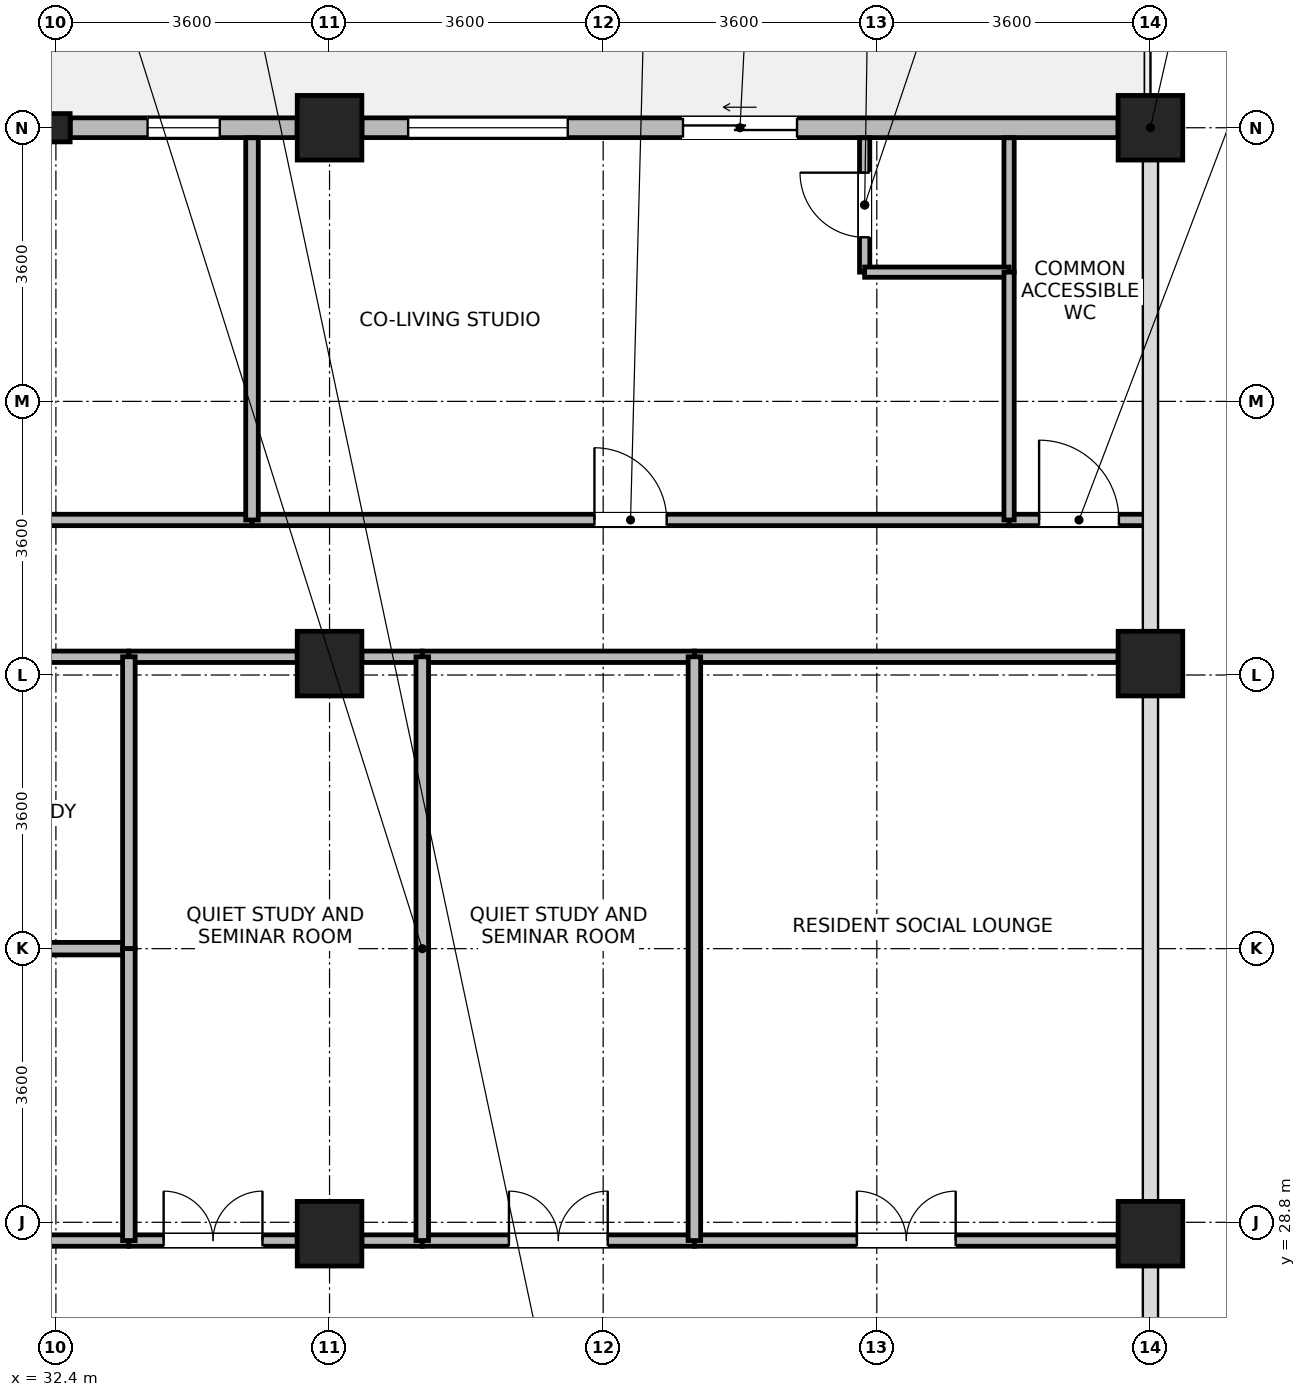
"""IFC4 building model, lengths in metres.
Left out: names, types, materials, properties, quantities, classifications, styles, units other than length and angle.
Written with IfcOpenShell. Run it as: python <this file> out.ifc"""

import sys

from ifc_helpers import new_model, si_unit, direction, frame, frame_2d, origin, origin_2d, place, context, subcontext, project, spatial, rectangle, i_section, extrude, source, transform, mapped, element, fill, save


model = new_model("IFC4")
c1 = context("Model", 3, precision=1e-05, world=origin(), true_north=direction((0.0, 1.0)))
c2 = subcontext(c1, "Body", "Model", "MODEL_VIEW")
j1 = project(units=[si_unit("LENGTHUNIT", "METRE"), si_unit("PLANEANGLEUNIT", "RADIAN")], contexts=[c1])
p1 = place(None, origin())
s1 = spatial("IfcSite", under=j1, at=p1, CompositionType="ELEMENT")
p2 = place(p1, origin())
s2 = spatial("IfcBuilding", under=s1, at=p2, CompositionType="ELEMENT")
p3 = place(p2, frame((0.0, 0.0, 253.6)))
s3 = spatial("IfcBuildingStorey", under=s2, at=p3, CompositionType="ELEMENT", Elevation=253.6)
m1 = source(origin(), c2, "Body", "SweptSolid", [
    extrude(rectangle(XDim=0.85, YDim=0.85, at=origin_2d()), origin(), (0.0, 0.0, 1.0), 3.7),
])
for number, where, z_axis, x_axis in (
    (1, (36.0, 43.2, 0.0), (0.0, 0.0, 1.0), (1.0, 0.0, 0.0)),
    (2, (36.0, 28.65, 0.0), (0.0, 0.0, 1.0), (1.0, 0.0, 0.0)),
    (3, (36.0, 36.15, 0.0), (0.0, 0.0, 1.0), (1.0, 0.0, 0.0)),
    (4, (46.8, 28.65, 0.0), (0.0, 0.0, 1.0), (1.0, 0.0, 0.0)),
    (5, (46.8, 36.15, 0.0), (0.0, 0.0, 1.0), (1.0, 0.0, 0.0)),
    (6, (46.8, 43.2, 0.0), (0.0, 0.0, 1.0), (1.0, 0.0, 0.0)),
):
    element("IfcColumn", number, at=place(p3, frame(where, z_axis=z_axis, x_axis=x_axis)), inside=s3, PredefinedType="COLUMN", context=c2, shape_type="MappedRepresentation", body=[
        mapped(m1, transform((0.0, 0.0, 0.0), x_axis=(1.0, 0.0, 0.0), y_axis=(0.0, 1.0, 0.0), z_axis=(0.0, 0.0, 1.0), scale=1.0)),
    ])
m2 = source(origin(), c2, "Body", "SweptSolid", [
    extrude(i_section(OverallWidth=0.374, OverallDepth=0.372, WebThickness=0.015, FlangeThickness=0.026, FilletRadius=0.015, at=origin_2d()), origin(), (0.0, 0.0, 1.0), 3.7),
])
p4 = place(p3, frame((32.4, 43.2, 0.0), z_axis=(0.0, 0.0, 1.0), x_axis=(1.0, 0.0, 0.0)))
e7 = element("IfcColumn", 7, at=p4, inside=s3, PredefinedType="COLUMN", context=c2, shape_type="MappedRepresentation", body=[
    mapped(m2, transform((0.0, 0.0, 0.0), x_axis=(1.0, 0.0, 0.0), y_axis=(0.0, 1.0, 0.0), z_axis=(0.0, 0.0, 1.0), scale=1.0)),
])
p5 = place(p3, frame((36.426, 43.2, 0.0), z_axis=(0.0, 0.0, 1.0), x_axis=(1.0, 0.0, 0.0)))
e8 = element("IfcWall", 8, at=p5, inside=s3, PredefinedType="STANDARD", context=c2, shape_type="SweptSolid", body=[
    extrude(rectangle(XDim=9.948, YDim=0.26, at=frame_2d((4.974, 0.0))), origin(), (0.0, 0.0, 1.0), 3.055),
])
p6 = place(p5, frame((4.224, 0.0, 0.0)))
e9 = element("IfcOpeningElement", 9, at=p6, cuts=e8, PredefinedType="OPENING", context=c2, shape_type="SweptSolid", body=[
    extrude(rectangle(XDim=1.5, YDim=2.15, at=frame_2d((0.75, 1.075))), frame((0.0, 0.14, 0.0), z_axis=(0.0, -1.0, 0.0), x_axis=(1.0, 0.0, 0.0)), (0.0, 0.0, 1.0), 0.28),
])
p7 = place(p5, frame((0.608, 0.0, 0.85)))
e10 = element("IfcOpeningElement", 10, at=p7, cuts=e8, PredefinedType="OPENING", context=c2, shape_type="SweptSolid", body=[
    extrude(rectangle(XDim=2.1, YDim=1.95, at=frame_2d((1.05, 0.975))), frame((0.0, 0.14, 0.0), z_axis=(0.0, -1.0, 0.0), x_axis=(1.0, 0.0, 0.0)), (0.0, 0.0, 1.0), 0.28),
])
p8 = place(p3, frame((32.588, 43.2, 0.0), z_axis=(0.0, 0.0, 1.0), x_axis=(1.0, 0.0, 0.0)))
e11 = element("IfcWall", 11, at=p8, inside=s3, PredefinedType="STANDARD", context=c2, shape_type="SweptSolid", body=[
    extrude(rectangle(XDim=2.986, YDim=0.26, at=frame_2d((1.493, 0.0))), origin(), (0.0, 0.0, 1.0), 3.055),
])
p9 = place(p8, frame((1.018, 0.0, 0.85)))
e12 = element("IfcOpeningElement", 12, at=p9, cuts=e11, PredefinedType="OPENING", context=c2, shape_type="SweptSolid", body=[
    extrude(rectangle(XDim=0.95, YDim=1.75, at=frame_2d((0.475, 0.875))), frame((0.0, 0.14, 0.0), z_axis=(0.0, -1.0, 0.0), x_axis=(1.0, 0.0, 0.0)), (0.0, 0.0, 1.0), 0.28),
])
p10 = place(p3, frame((43.04, 41.3, 0.0), z_axis=(0.0, 0.0, 1.0), x_axis=(0.0, 1.0, 0.0)))
e13 = element("IfcWall", 13, at=p10, inside=s3, PredefinedType="PARTITIONING", context=c2, shape_type="SweptSolid", body=[
    extrude(rectangle(XDim=1.768, YDim=0.135, at=frame_2d((0.884, 0.0))), origin(), (0.0, 0.0, 1.0), 3.455),
])
p11 = place(p10, frame((0.459, 0.0, 0.0)))
e14 = element("IfcOpeningElement", 14, at=p11, cuts=e13, PredefinedType="OPENING", context=c2, shape_type="SweptSolid", body=[
    extrude(rectangle(XDim=0.85, YDim=2.04, at=frame_2d((0.425, 1.02))), frame((0.0, 0.078, 0.0), z_axis=(0.0, -1.0, 0.0), x_axis=(1.0, 0.0, 0.0)), (0.0, 0.0, 1.0), 0.155),
])
p12 = place(p3, frame((44.94, 41.3, 0.0), z_axis=(0.0, 0.0, 1.0), x_axis=(0.0, 1.0, 0.0)))
e15 = element("IfcWall", 15, at=p12, inside=s3, PredefinedType="PARTITIONING", context=c2, shape_type="SweptSolid", body=[
    extrude(rectangle(XDim=1.768, YDim=0.135, at=frame_2d((0.884, 0.0))), origin(), (0.0, 0.0, 1.0), 3.455),
])
p13 = place(p3, frame((43.04, 41.3, 0.0), z_axis=(0.0, 0.0, 1.0), x_axis=(1.0, 0.0, 0.0)))
e16 = element("IfcWall", 16, at=p13, inside=s3, PredefinedType="PARTITIONING", context=c2, shape_type="SweptSolid", body=[
    extrude(rectangle(XDim=1.9, YDim=0.135, at=frame_2d((0.95, 0.0))), origin(), (0.0, 0.0, 1.0), 3.455),
])
p14 = place(p3, frame((23.12, 38.04, 0.0), z_axis=(0.0, 0.0, 1.0), x_axis=(1.0, 0.0, 0.0)))
e17 = element("IfcWall", 17, at=p14, inside=s3, PredefinedType="PARTITIONING", context=c2, shape_type="SweptSolid", body=[
    extrude(rectangle(XDim=11.86, YDim=0.15, at=frame_2d((5.93, 0.0))), origin(), (0.0, 0.0, 1.0), 3.455),
])
p15 = place(p14, frame((5.48, 0.0, 0.0)))
e18 = element("IfcOpeningElement", 18, at=p15, cuts=e17, PredefinedType="OPENING", context=c2, shape_type="SweptSolid", body=[
    extrude(rectangle(XDim=0.9, YDim=2.08, at=frame_2d((0.45, 1.04))), frame((0.0, 0.085, 0.0), z_axis=(0.0, -1.0, 0.0), x_axis=(1.0, 0.0, 0.0)), (0.0, 0.0, 1.0), 0.17),
])
p16 = place(p3, frame((34.98, 38.04, 0.0), z_axis=(0.0, 0.0, 1.0), x_axis=(1.0, 0.0, 0.0)))
e19 = element("IfcWall", 19, at=p16, inside=s3, PredefinedType="PARTITIONING", context=c2, shape_type="SweptSolid", body=[
    extrude(rectangle(XDim=9.96, YDim=0.15, at=frame_2d((4.98, 0.0))), origin(), (0.0, 0.0, 1.0), 3.455),
])
p17 = place(p16, frame((4.505, 0.0, 0.0)))
e20 = element("IfcOpeningElement", 20, at=p17, cuts=e19, PredefinedType="OPENING", context=c2, shape_type="SweptSolid", body=[
    extrude(rectangle(XDim=0.95, YDim=2.1, at=frame_2d((0.475, 1.05))), frame((0.0, 0.085, 0.0), z_axis=(0.0, -1.0, 0.0), x_axis=(1.0, 0.0, 0.0)), (0.0, 0.0, 1.0), 0.17),
])
p18 = place(p3, frame((40.8, 28.56, 0.0), z_axis=(0.0, 0.0, 1.0), x_axis=(1.0, 0.0, 0.0)))
e21 = element("IfcWall", 21, at=p18, inside=s3, PredefinedType="PARTITIONING", context=c2, shape_type="SweptSolid", body=[
    extrude(rectangle(XDim=5.575, YDim=0.15, at=frame_2d((2.788, 0.0))), origin(), (0.0, 0.0, 1.0), 2.905),
])
p19 = place(p18, frame((2.137, 0.0, 0.0)))
e22 = element("IfcOpeningElement", 22, at=p19, cuts=e21, PredefinedType="OPENING", context=c2, shape_type="SweptSolid", body=[
    extrude(rectangle(XDim=1.3, YDim=2.12, at=frame_2d((0.65, 1.06))), frame((0.0, 0.085, 0.0), z_axis=(0.0, -1.0, 0.0), x_axis=(1.0, 0.0, 0.0)), (0.0, 0.0, 1.0), 0.17),
])
p20 = place(p3, frame((40.8, 36.24, 0.0), z_axis=(0.0, 0.0, 1.0), x_axis=(1.0, 0.0, 0.0)))
e23 = element("IfcWall", 23, at=p20, inside=s3, PredefinedType="PARTITIONING", context=c2, shape_type="SweptSolid", body=[
    extrude(rectangle(XDim=5.575, YDim=0.15, at=frame_2d((2.788, 0.0))), origin(), (0.0, 0.0, 1.0), 2.905),
])
p21 = place(p3, frame((29.225, 28.56, 0.0), z_axis=(0.0, 0.0, 1.0), x_axis=(1.0, 0.0, 0.0)))
e24 = element("IfcWall", 24, at=p21, inside=s3, PredefinedType="PARTITIONING", context=c2, shape_type="SweptSolid", body=[
    extrude(rectangle(XDim=4.135, YDim=0.15, at=frame_2d((2.067, 0.0))), origin(), (0.0, 0.0, 1.0), 2.905),
])
p22 = place(p21, frame((1.637, 0.0, 0.0)))
e25 = element("IfcOpeningElement", 25, at=p22, cuts=e24, PredefinedType="OPENING", context=c2, shape_type="SweptSolid", body=[
    extrude(rectangle(XDim=0.86, YDim=2.02, at=frame_2d((0.43, 1.01))), frame((0.0, 0.085, 0.0), z_axis=(0.0, -1.0, 0.0), x_axis=(1.0, 0.0, 0.0)), (0.0, 0.0, 1.0), 0.17),
])
p23 = place(p3, frame((29.225, 36.24, 0.0), z_axis=(0.0, 0.0, 1.0), x_axis=(1.0, 0.0, 0.0)))
e26 = element("IfcWall", 26, at=p23, inside=s3, PredefinedType="PARTITIONING", context=c2, shape_type="SweptSolid", body=[
    extrude(rectangle(XDim=4.135, YDim=0.15, at=frame_2d((2.067, 0.0))), origin(), (0.0, 0.0, 1.0), 2.905),
])
p24 = place(p23, frame((1.417, 0.0, 0.0)))
e27 = element("IfcOpeningElement", 27, at=p24, cuts=e26, PredefinedType="OPENING", context=c2, shape_type="SweptSolid", body=[
    extrude(rectangle(XDim=1.3, YDim=2.12, at=frame_2d((0.65, 1.06))), frame((0.0, 0.085, 0.0), z_axis=(0.0, -1.0, 0.0), x_axis=(1.0, 0.0, 0.0)), (0.0, 0.0, 1.0), 0.17),
])
p25 = place(p3, frame((33.36, 28.56, 0.0), z_axis=(0.0, 0.0, 1.0), x_axis=(1.0, 0.0, 0.0)))
e28 = element("IfcWall", 28, at=p25, inside=s3, PredefinedType="PARTITIONING", context=c2, shape_type="SweptSolid", body=[
    extrude(rectangle(XDim=2.215, YDim=0.15, at=frame_2d((1.107, 0.0))), origin(), (0.0, 0.0, 1.0), 2.905),
])
p26 = place(p25, frame((0.458, 0.0, 0.0)))
e29 = element("IfcOpeningElement", 29, at=p26, cuts=e28, PredefinedType="OPENING", context=c2, shape_type="SweptSolid", body=[
    extrude(rectangle(XDim=1.3, YDim=2.12, at=frame_2d((0.65, 1.06))), frame((0.0, 0.085, 0.0), z_axis=(0.0, -1.0, 0.0), x_axis=(1.0, 0.0, 0.0)), (0.0, 0.0, 1.0), 0.17),
])
p27 = place(p3, frame((36.425, 28.56, 0.0), z_axis=(0.0, 0.0, 1.0), x_axis=(1.0, 0.0, 0.0)))
e30 = element("IfcWall", 30, at=p27, inside=s3, PredefinedType="PARTITIONING", context=c2, shape_type="SweptSolid", body=[
    extrude(rectangle(XDim=0.795, YDim=0.15, at=frame_2d((0.397, 0.0))), origin(), (0.0, 0.0, 1.0), 2.905),
])
p28 = place(p3, frame((33.36, 36.24, 0.0), z_axis=(0.0, 0.0, 1.0), x_axis=(1.0, 0.0, 0.0)))
e31 = element("IfcWall", 31, at=p28, inside=s3, PredefinedType="PARTITIONING", context=c2, shape_type="SweptSolid", body=[
    extrude(rectangle(XDim=2.215, YDim=0.15, at=frame_2d((1.107, 0.0))), origin(), (0.0, 0.0, 1.0), 2.905),
])
p29 = place(p3, frame((36.425, 36.24, 0.0), z_axis=(0.0, 0.0, 1.0), x_axis=(1.0, 0.0, 0.0)))
e32 = element("IfcWall", 32, at=p29, inside=s3, PredefinedType="PARTITIONING", context=c2, shape_type="SweptSolid", body=[
    extrude(rectangle(XDim=0.795, YDim=0.15, at=frame_2d((0.397, 0.0))), origin(), (0.0, 0.0, 1.0), 2.905),
])
p30 = place(p3, frame((37.22, 28.56, 0.0), z_axis=(0.0, 0.0, 1.0), x_axis=(1.0, 0.0, 0.0)))
e33 = element("IfcWall", 33, at=p30, inside=s3, PredefinedType="PARTITIONING", context=c2, shape_type="SweptSolid", body=[
    extrude(rectangle(XDim=3.58, YDim=0.15, at=frame_2d((1.79, 0.0))), origin(), (0.0, 0.0, 1.0), 2.905),
])
p31 = place(p30, frame((1.14, 0.0, 0.0)))
e34 = element("IfcOpeningElement", 34, at=p31, cuts=e33, PredefinedType="OPENING", context=c2, shape_type="SweptSolid", body=[
    extrude(rectangle(XDim=1.3, YDim=2.12, at=frame_2d((0.65, 1.06))), frame((0.0, 0.085, 0.0), z_axis=(0.0, -1.0, 0.0), x_axis=(1.0, 0.0, 0.0)), (0.0, 0.0, 1.0), 0.17),
])
p32 = place(p3, frame((37.22, 36.24, 0.0), z_axis=(0.0, 0.0, 1.0), x_axis=(1.0, 0.0, 0.0)))
e35 = element("IfcWall", 35, at=p32, inside=s3, PredefinedType="PARTITIONING", context=c2, shape_type="SweptSolid", body=[
    extrude(rectangle(XDim=3.58, YDim=0.15, at=frame_2d((1.79, 0.0))), origin(), (0.0, 0.0, 1.0), 2.905),
])
p33 = place(p3, frame((44.94, 38.04, 0.0), z_axis=(0.0, 0.0, 1.0), x_axis=(1.0, 0.0, 0.0)))
e36 = element("IfcWall", 36, at=p33, inside=s3, PredefinedType="PARTITIONING", context=c2, shape_type="SweptSolid", body=[
    extrude(rectangle(XDim=1.84, YDim=0.15, at=frame_2d((0.92, 0.0))), origin(), (0.0, 0.0, 1.0), 3.455),
])
p34 = place(p33, frame((0.395, 0.0, 0.0)))
e37 = element("IfcOpeningElement", 37, at=p34, cuts=e36, PredefinedType="OPENING", context=c2, shape_type="SweptSolid", body=[
    extrude(rectangle(XDim=1.05, YDim=2.12, at=frame_2d((0.525, 1.06))), frame((0.0, 0.085, 0.0), z_axis=(0.0, -1.0, 0.0), x_axis=(1.0, 0.0, 0.0)), (0.0, 0.0, 1.0), 0.17),
])
for number, where, z_axis, x_axis in (
    (38, (37.22, 28.56, 0.0), (0.0, 0.0, 1.0), (0.0, 1.0, 0.0)),
    (39, (40.8, 28.56, 0.0), (0.0, 0.0, 1.0), (0.0, 1.0, 0.0)),
):
    element("IfcWall", number, at=place(p3, frame(where, z_axis=z_axis, x_axis=x_axis)), inside=s3, PredefinedType="PARTITIONING", context=c2, shape_type="SweptSolid", body=[
        extrude(rectangle(XDim=7.68, YDim=0.165, at=frame_2d((3.84, 0.0))), origin(), (0.0, 0.0, 1.0), 3.455),
    ])
p35 = place(p3, frame((34.98, 38.04, 0.0), z_axis=(0.0, 0.0, 1.0), x_axis=(0.0, 1.0, 0.0)))
e40 = element("IfcWall", 40, at=p35, inside=s3, PredefinedType="PARTITIONING", context=c2, shape_type="SweptSolid", body=[
    extrude(rectangle(XDim=5.028, YDim=0.165, at=frame_2d((2.514, 0.0))), origin(), (0.0, 0.0, 1.0), 3.455),
])
p36 = place(p3, frame((28.84, 32.4, 0.0), z_axis=(0.0, 0.0, 1.0), x_axis=(1.0, 0.0, 0.0)))
e41 = element("IfcWall", 41, at=p36, inside=s3, PredefinedType="PARTITIONING", context=c2, shape_type="SweptSolid", body=[
    extrude(rectangle(XDim=4.52, YDim=0.165, at=frame_2d((2.26, 0.0))), origin(), (0.0, 0.0, 1.0), 3.455),
])
p37 = place(p3, frame((33.36, 32.4, 0.0), z_axis=(0.0, 0.0, 1.0), x_axis=(0.0, 1.0, 0.0)))
e42 = element("IfcWall", 42, at=p37, inside=s3, PredefinedType="PARTITIONING", context=c2, shape_type="SweptSolid", body=[
    extrude(rectangle(XDim=3.84, YDim=0.165, at=frame_2d((1.92, 0.0))), origin(), (0.0, 0.0, 1.0), 3.455),
])
p38 = place(p3, frame((33.36, 28.56, 0.0), z_axis=(0.0, 0.0, 1.0), x_axis=(0.0, 1.0, 0.0)))
e43 = element("IfcWall", 43, at=p38, inside=s3, PredefinedType="PARTITIONING", context=c2, shape_type="SweptSolid", body=[
    extrude(rectangle(XDim=3.84, YDim=0.165, at=frame_2d((1.92, 0.0))), origin(), (0.0, 0.0, 1.0), 3.455),
])
p39 = place(p3, frame((44.94, 38.04, 0.0), z_axis=(0.0, 0.0, 1.0), x_axis=(0.0, 1.0, 0.0)))
e44 = element("IfcWall", 44, at=p39, inside=s3, PredefinedType="PARTITIONING", context=c2, shape_type="SweptSolid", body=[
    extrude(rectangle(XDim=3.26, YDim=0.135, at=frame_2d((1.63, 0.0))), origin(), (0.0, 0.0, 1.0), 3.455),
])
p40 = place(p6, origin())
e45 = element("IfcDoor", 45, at=p40, inside=s3, OperationType="SLIDING_TO_LEFT", PredefinedType="DOOR", context=c2, shape_type="SweptSolid", body=[
    extrude(rectangle(XDim=1.5, YDim=2.15, at=frame_2d((0.75, 1.075))), frame((0.0, 0.025, 0.0), z_axis=(0.0, -1.0, 0.0), x_axis=(1.0, 0.0, 0.0)), (0.0, 0.0, 1.0), 0.05),
])
fill(e9, e45)
p41 = place(p7, origin())
e46 = element("IfcWindow", 46, at=p41, inside=s3, PartitioningType="SINGLE_PANEL", PredefinedType="WINDOW", context=c2, shape_type="SweptSolid", body=[
    extrude(rectangle(XDim=2.1, YDim=1.95, at=frame_2d((1.05, 0.975))), frame((0.0, 0.03, 0.0), z_axis=(0.0, -1.0, 0.0), x_axis=(1.0, 0.0, 0.0)), (0.0, 0.0, 1.0), 0.06),
])
fill(e10, e46)
p42 = place(p9, origin())
e47 = element("IfcWindow", 47, at=p42, inside=s3, PartitioningType="SINGLE_PANEL", PredefinedType="WINDOW", context=c2, shape_type="SweptSolid", body=[
    extrude(rectangle(XDim=0.95, YDim=1.75, at=frame_2d((0.475, 0.875))), frame((0.0, 0.03, 0.0), z_axis=(0.0, -1.0, 0.0), x_axis=(1.0, 0.0, 0.0)), (0.0, 0.0, 1.0), 0.06),
])
fill(e12, e47)
p43 = place(p11, origin())
e48 = element("IfcDoor", 48, at=p43, inside=s3, OperationType="SINGLE_SWING_RIGHT", PredefinedType="DOOR", context=c2, shape_type="SweptSolid", body=[
    extrude(rectangle(XDim=0.85, YDim=2.04, at=frame_2d((0.425, 1.02))), frame((0.0, 0.025, 0.0), z_axis=(0.0, -1.0, 0.0), x_axis=(1.0, 0.0, 0.0)), (0.0, 0.0, 1.0), 0.05),
])
fill(e14, e48)
p44 = place(p17, origin())
e49 = element("IfcDoor", 49, at=p44, inside=s3, OperationType="SINGLE_SWING_LEFT", PredefinedType="DOOR", context=c2, shape_type="SweptSolid", body=[
    extrude(rectangle(XDim=0.95, YDim=2.1, at=frame_2d((0.475, 1.05))), frame((0.0, 0.025, 0.0), z_axis=(0.0, -1.0, 0.0), x_axis=(1.0, 0.0, 0.0)), (0.0, 0.0, 1.0), 0.05),
])
fill(e20, e49)
p45 = place(p19, origin())
e50 = element("IfcDoor", 50, at=p45, inside=s3, OperationType="DOUBLE_DOOR_SINGLE_SWING", PredefinedType="DOOR", context=c2, shape_type="SweptSolid", body=[
    extrude(rectangle(XDim=1.3, YDim=2.12, at=frame_2d((0.65, 1.06))), frame((0.0, 0.025, 0.0), z_axis=(0.0, -1.0, 0.0), x_axis=(1.0, 0.0, 0.0)), (0.0, 0.0, 1.0), 0.05),
])
fill(e22, e50)
p46 = place(p26, origin())
e51 = element("IfcDoor", 51, at=p46, inside=s3, OperationType="DOUBLE_DOOR_SINGLE_SWING", PredefinedType="DOOR", context=c2, shape_type="SweptSolid", body=[
    extrude(rectangle(XDim=1.3, YDim=2.12, at=frame_2d((0.65, 1.06))), frame((0.0, 0.025, 0.0), z_axis=(0.0, -1.0, 0.0), x_axis=(1.0, 0.0, 0.0)), (0.0, 0.0, 1.0), 0.05),
])
fill(e29, e51)
p47 = place(p31, origin())
e52 = element("IfcDoor", 52, at=p47, inside=s3, OperationType="DOUBLE_DOOR_SINGLE_SWING", PredefinedType="DOOR", context=c2, shape_type="SweptSolid", body=[
    extrude(rectangle(XDim=1.3, YDim=2.12, at=frame_2d((0.65, 1.06))), frame((0.0, 0.025, 0.0), z_axis=(0.0, -1.0, 0.0), x_axis=(1.0, 0.0, 0.0)), (0.0, 0.0, 1.0), 0.05),
])
fill(e34, e52)
p48 = place(p34, origin())
e53 = element("IfcDoor", 53, at=p48, inside=s3, OperationType="SINGLE_SWING_LEFT", PredefinedType="DOOR", context=c2, shape_type="SweptSolid", body=[
    extrude(rectangle(XDim=1.05, YDim=2.12, at=frame_2d((0.525, 1.06))), frame((0.0, 0.025, 0.0), z_axis=(0.0, -1.0, 0.0), x_axis=(1.0, 0.0, 0.0)), (0.0, 0.0, 1.0), 0.05),
])
fill(e37, e53)
save(model, sys.argv[1])
